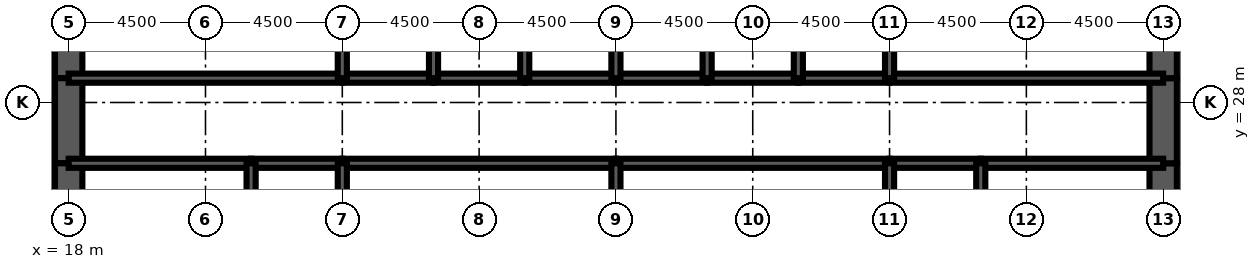
"""IFC4 building model, lengths in metres.
Left out: names, types, materials, properties, quantities, classifications, styles, units other than length and angle.
Written with IfcOpenShell. Run it as: python <this file> out.ifc"""

import sys

from ifc_helpers import new_model, si_unit, direction, frame, frame_2d, origin, place, context, subcontext, project, spatial, rectangle, extrude, element, fill, save


model = new_model("IFC4")
c1 = context("Model", 3, precision=1e-05, world=origin(), true_north=direction((0.0, 1.0)))
c2 = subcontext(c1, "Body", "Model", "MODEL_VIEW")
j1 = project(units=[si_unit("LENGTHUNIT", "METRE"), si_unit("PLANEANGLEUNIT", "RADIAN")], contexts=[c1])
p1 = place(None, origin())
s1 = spatial("IfcSite", under=j1, at=p1, CompositionType="ELEMENT")
p2 = place(p1, origin())
s2 = spatial("IfcBuilding", under=s1, at=p2, CompositionType="ELEMENT")
p3 = place(p2, frame((0.0, 0.0, 86.0)))
s3 = spatial("IfcBuildingStorey", under=s2, at=p3, CompositionType="ELEMENT", Elevation=86.0)
p4 = place(p3, frame((18.0, 32.0, 0.0), z_axis=(0.0, 0.0, 1.0), x_axis=(0.0, -1.0, 0.0)))
e1 = element("IfcWall", 1, at=p4, inside=s3, PredefinedType="SHEAR", context=c2, shape_type="SweptSolid", body=[
    extrude(rectangle(XDim=3.2, YDim=0.9, at=frame_2d((1.6, 0.0))), origin(), (0.0, 0.0, 1.0), 4.5),
])
p5 = place(p3, frame((18.0, 28.8, 0.0), z_axis=(0.0, 0.0, 1.0), x_axis=(0.0, -1.0, 0.0)))
e2 = element("IfcWall", 2, at=p5, inside=s3, PredefinedType="SHEAR", context=c2, shape_type="SweptSolid", body=[
    extrude(rectangle(XDim=2.8, YDim=0.9, at=frame_2d((1.4, 0.0))), origin(), (0.0, 0.0, 1.0), 4.5),
])
p6 = place(p5, frame((0.4, 0.0, 0.0)))
e3 = element("IfcOpeningElement", 3, at=p6, cuts=e2, PredefinedType="OPENING", context=c2, shape_type="SweptSolid", body=[
    extrude(rectangle(XDim=1.8, YDim=2.1, at=frame_2d((0.9, 1.05))), frame((0.0, 0.46, 0.0), z_axis=(0.0, -1.0, 0.0), x_axis=(1.0, 0.0, 0.0)), (0.0, 0.0, 1.0), 0.92),
])
for number, where, z_axis, x_axis in (
    (4, (18.0, 26.0, 0.0), (0.0, 0.0, 1.0), (0.0, -1.0, 0.0)),
    (5, (54.0, 22.0, 0.0), (0.0, 0.0, 1.0), (0.0, 1.0, 0.0)),
):
    element("IfcWall", number, at=place(p3, frame(where, z_axis=z_axis, x_axis=x_axis)), inside=s3, PredefinedType="SHEAR", context=c2, shape_type="SweptSolid", body=[
        extrude(rectangle(XDim=4.0, YDim=0.9, at=frame_2d((2.0, 0.0))), origin(), (0.0, 0.0, 1.0), 4.5),
    ])
p7 = place(p3, frame((54.0, 26.0, 0.0), z_axis=(0.0, 0.0, 1.0), x_axis=(0.0, 1.0, 0.0)))
e6 = element("IfcWall", 6, at=p7, inside=s3, PredefinedType="SHEAR", context=c2, shape_type="SweptSolid", body=[
    extrude(rectangle(XDim=2.8, YDim=0.9, at=frame_2d((1.4, 0.0))), origin(), (0.0, 0.0, 1.0), 4.5),
])
p8 = place(p7, frame((0.6, 0.0, 0.0)))
e7 = element("IfcOpeningElement", 7, at=p8, cuts=e6, PredefinedType="OPENING", context=c2, shape_type="SweptSolid", body=[
    extrude(rectangle(XDim=1.8, YDim=2.1, at=frame_2d((0.9, 1.05))), frame((0.0, 0.46, 0.0), z_axis=(0.0, -1.0, 0.0), x_axis=(1.0, 0.0, 0.0)), (0.0, 0.0, 1.0), 0.92),
])
p9 = place(p3, frame((54.0, 28.8, 0.0), z_axis=(0.0, 0.0, 1.0), x_axis=(0.0, 1.0, 0.0)))
e8 = element("IfcWall", 8, at=p9, inside=s3, PredefinedType="SHEAR", context=c2, shape_type="SweptSolid", body=[
    extrude(rectangle(XDim=3.2, YDim=0.9, at=frame_2d((1.6, 0.0))), origin(), (0.0, 0.0, 1.0), 4.5),
])
p10 = place(p3, frame((18.0, 28.8, 0.0), z_axis=(0.0, 0.0, 1.0), x_axis=(1.0, 0.0, 0.0)))
e9 = element("IfcWall", 9, at=p10, inside=s3, PredefinedType="SOLIDWALL", context=c2, shape_type="SweptSolid", body=[
    extrude(rectangle(XDim=9.0, YDim=0.3, at=frame_2d((4.5, 0.0))), origin(), (0.0, 0.0, 1.0), 4.5),
])
p11 = place(p10, frame((0.65, 0.0, 0.0)))
e10 = element("IfcOpeningElement", 10, at=p11, cuts=e9, PredefinedType="OPENING", context=c2, shape_type="SweptSolid", body=[
    extrude(rectangle(XDim=1.0, YDim=2.1, at=frame_2d((0.5, 1.05))), frame((0.0, 0.16, 0.0), z_axis=(0.0, -1.0, 0.0), x_axis=(1.0, 0.0, 0.0)), (0.0, 0.0, 1.0), 0.32),
])
p12 = place(p3, frame((27.0, 28.8, 0.0), z_axis=(0.0, 0.0, 1.0), x_axis=(1.0, 0.0, 0.0)))
e11 = element("IfcWall", 11, at=p12, inside=s3, PredefinedType="SOLIDWALL", context=c2, shape_type="SweptSolid", body=[
    extrude(rectangle(XDim=3.0, YDim=0.3, at=frame_2d((1.5, 0.0))), origin(), (0.0, 0.0, 1.0), 4.5),
])
p13 = place(p12, frame((0.95, 0.0, 0.0)))
e12 = element("IfcOpeningElement", 12, at=p13, cuts=e11, PredefinedType="OPENING", context=c2, shape_type="SweptSolid", body=[
    extrude(rectangle(XDim=1.1, YDim=2.2, at=frame_2d((0.55, 1.1))), frame((0.0, 0.16, 0.0), z_axis=(0.0, -1.0, 0.0), x_axis=(1.0, 0.0, 0.0)), (0.0, 0.0, 1.0), 0.32),
])
p14 = place(p3, frame((30.0, 28.8, 0.0), z_axis=(0.0, 0.0, 1.0), x_axis=(1.0, 0.0, 0.0)))
e13 = element("IfcWall", 13, at=p14, inside=s3, PredefinedType="SOLIDWALL", context=c2, shape_type="SweptSolid", body=[
    extrude(rectangle(XDim=3.0, YDim=0.3, at=frame_2d((1.5, 0.0))), origin(), (0.0, 0.0, 1.0), 4.5),
])
p15 = place(p14, frame((0.95, 0.0, 0.0)))
e14 = element("IfcOpeningElement", 14, at=p15, cuts=e13, PredefinedType="OPENING", context=c2, shape_type="SweptSolid", body=[
    extrude(rectangle(XDim=1.1, YDim=2.2, at=frame_2d((0.55, 1.1))), frame((0.0, 0.16, 0.0), z_axis=(0.0, -1.0, 0.0), x_axis=(1.0, 0.0, 0.0)), (0.0, 0.0, 1.0), 0.32),
])
p16 = place(p3, frame((33.0, 28.8, 0.0), z_axis=(0.0, 0.0, 1.0), x_axis=(1.0, 0.0, 0.0)))
e15 = element("IfcWall", 15, at=p16, inside=s3, PredefinedType="SOLIDWALL", context=c2, shape_type="SweptSolid", body=[
    extrude(rectangle(XDim=3.0, YDim=0.3, at=frame_2d((1.5, 0.0))), origin(), (0.0, 0.0, 1.0), 4.5),
])
p17 = place(p16, frame((0.95, 0.0, 0.0)))
e16 = element("IfcOpeningElement", 16, at=p17, cuts=e15, PredefinedType="OPENING", context=c2, shape_type="SweptSolid", body=[
    extrude(rectangle(XDim=1.1, YDim=2.2, at=frame_2d((0.55, 1.1))), frame((0.0, 0.16, 0.0), z_axis=(0.0, -1.0, 0.0), x_axis=(1.0, 0.0, 0.0)), (0.0, 0.0, 1.0), 0.32),
])
for number, where, z_axis, x_axis in (
    (17, (36.0, 28.8, 0.0), (0.0, 0.0, 1.0), (1.0, 0.0, 0.0)),
    (18, (39.0, 28.8, 0.0), (0.0, 0.0, 1.0), (1.0, 0.0, 0.0)),
):
    element("IfcWall", number, at=place(p3, frame(where, z_axis=z_axis, x_axis=x_axis)), inside=s3, PredefinedType="SOLIDWALL", context=c2, shape_type="SweptSolid", body=[
        extrude(rectangle(XDim=3.0, YDim=0.3, at=frame_2d((1.5, 0.0))), origin(), (0.0, 0.0, 1.0), 4.5),
    ])
p18 = place(p3, frame((42.0, 28.8, 0.0), z_axis=(0.0, 0.0, 1.0), x_axis=(1.0, 0.0, 0.0)))
e19 = element("IfcWall", 19, at=p18, inside=s3, PredefinedType="SOLIDWALL", context=c2, shape_type="SweptSolid", body=[
    extrude(rectangle(XDim=3.0, YDim=0.3, at=frame_2d((1.5, 0.0))), origin(), (0.0, 0.0, 1.0), 4.5),
])
p19 = place(p18, frame((0.95, 0.0, 0.0)))
e20 = element("IfcOpeningElement", 20, at=p19, cuts=e19, PredefinedType="OPENING", context=c2, shape_type="SweptSolid", body=[
    extrude(rectangle(XDim=1.1, YDim=2.2, at=frame_2d((0.55, 1.1))), frame((0.0, 0.16, 0.0), z_axis=(0.0, -1.0, 0.0), x_axis=(1.0, 0.0, 0.0)), (0.0, 0.0, 1.0), 0.32),
])
p20 = place(p3, frame((45.0, 28.8, 0.0), z_axis=(0.0, 0.0, 1.0), x_axis=(1.0, 0.0, 0.0)))
e21 = element("IfcWall", 21, at=p20, inside=s3, PredefinedType="SOLIDWALL", context=c2, shape_type="SweptSolid", body=[
    extrude(rectangle(XDim=9.0, YDim=0.3, at=frame_2d((4.5, 0.0))), origin(), (0.0, 0.0, 1.0), 4.5),
])
p21 = place(p20, frame((7.35, 0.0, 0.0)))
e22 = element("IfcOpeningElement", 22, at=p21, cuts=e21, PredefinedType="OPENING", context=c2, shape_type="SweptSolid", body=[
    extrude(rectangle(XDim=1.0, YDim=2.1, at=frame_2d((0.5, 1.05))), frame((0.0, 0.16, 0.0), z_axis=(0.0, -1.0, 0.0), x_axis=(1.0, 0.0, 0.0)), (0.0, 0.0, 1.0), 0.32),
])
p22 = place(p3, frame((18.0, 26.0, 0.0), z_axis=(0.0, 0.0, 1.0), x_axis=(1.0, 0.0, 0.0)))
e23 = element("IfcWall", 23, at=p22, inside=s3, PredefinedType="SOLIDWALL", context=c2, shape_type="SweptSolid", body=[
    extrude(rectangle(XDim=6.0, YDim=0.3, at=frame_2d((3.0, 0.0))), origin(), (0.0, 0.0, 1.0), 4.5),
])
p23 = place(p3, frame((24.0, 26.0, 0.0), z_axis=(0.0, 0.0, 1.0), x_axis=(1.0, 0.0, 0.0)))
e24 = element("IfcWall", 24, at=p23, inside=s3, PredefinedType="SOLIDWALL", context=c2, shape_type="SweptSolid", body=[
    extrude(rectangle(XDim=3.0, YDim=0.3, at=frame_2d((1.5, 0.0))), origin(), (0.0, 0.0, 1.0), 4.5),
])
for number, where, z_axis, x_axis in (
    (25, (27.0, 26.0, 0.0), (0.0, 0.0, 1.0), (1.0, 0.0, 0.0)),
    (26, (36.0, 26.0, 0.0), (0.0, 0.0, 1.0), (1.0, 0.0, 0.0)),
):
    element("IfcWall", number, at=place(p3, frame(where, z_axis=z_axis, x_axis=x_axis)), inside=s3, PredefinedType="SOLIDWALL", context=c2, shape_type="SweptSolid", body=[
        extrude(rectangle(XDim=9.0, YDim=0.3, at=frame_2d((4.5, 0.0))), origin(), (0.0, 0.0, 1.0), 4.5),
    ])
p24 = place(p3, frame((45.0, 26.0, 0.0), z_axis=(0.0, 0.0, 1.0), x_axis=(1.0, 0.0, 0.0)))
e27 = element("IfcWall", 27, at=p24, inside=s3, PredefinedType="SOLIDWALL", context=c2, shape_type="SweptSolid", body=[
    extrude(rectangle(XDim=3.0, YDim=0.3, at=frame_2d((1.5, 0.0))), origin(), (0.0, 0.0, 1.0), 4.5),
])
p25 = place(p3, frame((48.0, 26.0, 0.0), z_axis=(0.0, 0.0, 1.0), x_axis=(1.0, 0.0, 0.0)))
e28 = element("IfcWall", 28, at=p25, inside=s3, PredefinedType="SOLIDWALL", context=c2, shape_type="SweptSolid", body=[
    extrude(rectangle(XDim=6.0, YDim=0.3, at=frame_2d((3.0, 0.0))), origin(), (0.0, 0.0, 1.0), 4.5),
])
for number, where, z_axis, x_axis in (
    (29, (27.0, 28.8, 0.0), (0.0, 0.0, 1.0), (0.0, 1.0, 0.0)),
    (30, (30.0, 28.8, 0.0), (0.0, 0.0, 1.0), (0.0, 1.0, 0.0)),
    (31, (33.0, 28.8, 0.0), (0.0, 0.0, 1.0), (0.0, 1.0, 0.0)),
    (32, (36.0, 28.8, 0.0), (0.0, 0.0, 1.0), (0.0, 1.0, 0.0)),
    (33, (39.0, 28.8, 0.0), (0.0, 0.0, 1.0), (0.0, 1.0, 0.0)),
    (34, (42.0, 28.8, 0.0), (0.0, 0.0, 1.0), (0.0, 1.0, 0.0)),
    (35, (45.0, 28.8, 0.0), (0.0, 0.0, 1.0), (0.0, 1.0, 0.0)),
):
    element("IfcWall", number, at=place(p3, frame(where, z_axis=z_axis, x_axis=x_axis)), inside=s3, PredefinedType="SOLIDWALL", context=c2, shape_type="SweptSolid", body=[
        extrude(rectangle(XDim=3.2, YDim=0.3, at=frame_2d((1.6, 0.0))), origin(), (0.0, 0.0, 1.0), 4.5),
    ])
for number, where, z_axis, x_axis in (
    (36, (24.0, 22.0, 0.0), (0.0, 0.0, 1.0), (0.0, 1.0, 0.0)),
    (37, (27.0, 22.0, 0.0), (0.0, 0.0, 1.0), (0.0, 1.0, 0.0)),
    (38, (36.0, 22.0, 0.0), (0.0, 0.0, 1.0), (0.0, 1.0, 0.0)),
    (39, (45.0, 22.0, 0.0), (0.0, 0.0, 1.0), (0.0, 1.0, 0.0)),
    (40, (48.0, 22.0, 0.0), (0.0, 0.0, 1.0), (0.0, 1.0, 0.0)),
):
    element("IfcWall", number, at=place(p3, frame(where, z_axis=z_axis, x_axis=x_axis)), inside=s3, PredefinedType="SOLIDWALL", context=c2, shape_type="SweptSolid", body=[
        extrude(rectangle(XDim=4.0, YDim=0.3, at=frame_2d((2.0, 0.0))), origin(), (0.0, 0.0, 1.0), 4.5),
    ])
p26 = place(p3, frame((39.0, 22.15, 0.0), z_axis=(0.0, 0.0, 1.0), x_axis=(0.0, 1.0, 0.0)))
e41 = element("IfcWall", 41, at=p26, inside=s3, PredefinedType="PARTITIONING", context=c2, shape_type="SweptSolid", body=[
    extrude(rectangle(XDim=3.7, YDim=0.15, at=frame_2d((1.85, 0.0))), origin(), (0.0, 0.0, 1.0), 3.0),
])
p27 = place(p26, frame((2.2, 0.0, 0.0)))
e42 = element("IfcOpeningElement", 42, at=p27, cuts=e41, PredefinedType="OPENING", context=c2, shape_type="SweptSolid", body=[
    extrude(rectangle(XDim=1.0, YDim=2.1, at=frame_2d((0.5, 1.05))), frame((0.0, 0.085, 0.0), z_axis=(0.0, -1.0, 0.0), x_axis=(1.0, 0.0, 0.0)), (0.0, 0.0, 1.0), 0.17),
])
for number, where, z_axis, x_axis in (
    (43, (20.325, 22.15, 0.0), (0.0, 0.0, 1.0), (0.0, 1.0, 0.0)),
    (44, (51.375, 22.15, 0.0), (0.0, 0.0, 1.0), (0.0, 1.0, 0.0)),
):
    element("IfcWall", number, at=place(p3, frame(where, z_axis=z_axis, x_axis=x_axis)), inside=s3, PredefinedType="PARTITIONING", context=c2, shape_type="SweptSolid", body=[
        extrude(rectangle(XDim=3.7, YDim=0.15, at=frame_2d((1.85, 0.0))), origin(), (0.0, 0.0, 1.0), 3.0),
    ])
p28 = place(p27, origin())
e45 = element("IfcDoor", 45, at=p28, inside=s3, OperationType="SINGLE_SWING_RIGHT", PredefinedType="DOOR", context=c2, shape_type="SweptSolid", body=[
    extrude(rectangle(XDim=1.0, YDim=2.1, at=frame_2d((0.5, 1.05))), frame((0.0, 0.025, 0.0), z_axis=(0.0, -1.0, 0.0), x_axis=(1.0, 0.0, 0.0)), (0.0, 0.0, 1.0), 0.05),
])
fill(e42, e45)
p29 = place(p19, origin())
e46 = element("IfcDoor", 46, at=p29, inside=s3, OperationType="DOUBLE_DOOR_SLIDING", PredefinedType="USERDEFINED", context=c2, shape_type="SweptSolid", body=[
    extrude(rectangle(XDim=1.1, YDim=2.2, at=frame_2d((0.55, 1.1))), frame((0.0, 0.025, 0.0), z_axis=(0.0, -1.0, 0.0), x_axis=(1.0, 0.0, 0.0)), (0.0, 0.0, 1.0), 0.05),
])
fill(e20, e46)
p30 = place(p13, origin())
e47 = element("IfcDoor", 47, at=p30, inside=s3, OperationType="DOUBLE_DOOR_SLIDING", PredefinedType="USERDEFINED", context=c2, shape_type="SweptSolid", body=[
    extrude(rectangle(XDim=1.1, YDim=2.2, at=frame_2d((0.55, 1.1))), frame((0.0, 0.025, 0.0), z_axis=(0.0, -1.0, 0.0), x_axis=(1.0, 0.0, 0.0)), (0.0, 0.0, 1.0), 0.05),
])
fill(e12, e47)
p31 = place(p15, origin())
e48 = element("IfcDoor", 48, at=p31, inside=s3, OperationType="DOUBLE_DOOR_SLIDING", PredefinedType="USERDEFINED", context=c2, shape_type="SweptSolid", body=[
    extrude(rectangle(XDim=1.1, YDim=2.2, at=frame_2d((0.55, 1.1))), frame((0.0, 0.025, 0.0), z_axis=(0.0, -1.0, 0.0), x_axis=(1.0, 0.0, 0.0)), (0.0, 0.0, 1.0), 0.05),
])
fill(e14, e48)
p32 = place(p17, origin())
e49 = element("IfcDoor", 49, at=p32, inside=s3, OperationType="DOUBLE_DOOR_SLIDING", PredefinedType="USERDEFINED", context=c2, shape_type="SweptSolid", body=[
    extrude(rectangle(XDim=1.1, YDim=2.2, at=frame_2d((0.55, 1.1))), frame((0.0, 0.025, 0.0), z_axis=(0.0, -1.0, 0.0), x_axis=(1.0, 0.0, 0.0)), (0.0, 0.0, 1.0), 0.05),
])
fill(e16, e49)
p33 = place(p11, origin())
e50 = element("IfcDoor", 50, at=p33, inside=s3, OperationType="SINGLE_SWING_LEFT", PredefinedType="DOOR", context=c2, shape_type="SweptSolid", body=[
    extrude(rectangle(XDim=1.0, YDim=2.1, at=frame_2d((0.5, 1.05))), frame((0.0, 0.025, 0.0), z_axis=(0.0, -1.0, 0.0), x_axis=(1.0, 0.0, 0.0)), (0.0, 0.0, 1.0), 0.05),
])
fill(e10, e50)
p34 = place(p21, origin())
e51 = element("IfcDoor", 51, at=p34, inside=s3, OperationType="SINGLE_SWING_RIGHT", PredefinedType="DOOR", context=c2, shape_type="SweptSolid", body=[
    extrude(rectangle(XDim=1.0, YDim=2.1, at=frame_2d((0.5, 1.05))), frame((0.0, 0.025, 0.0), z_axis=(0.0, -1.0, 0.0), x_axis=(1.0, 0.0, 0.0)), (0.0, 0.0, 1.0), 0.05),
])
fill(e22, e51)
p35 = place(p6, origin())
e52 = element("IfcDoor", 52, at=p35, inside=s3, OperationType="SINGLE_SWING_LEFT", PredefinedType="DOOR", context=c2, shape_type="SweptSolid", body=[
    extrude(rectangle(XDim=1.8, YDim=2.1, at=frame_2d((0.9, 1.05))), frame((0.0, 0.45, 0.0), z_axis=(0.0, -1.0, 0.0), x_axis=(1.0, 0.0, 0.0)), (0.0, 0.0, 1.0), 0.899),
])
fill(e3, e52)
p36 = place(p8, origin())
e53 = element("IfcDoor", 53, at=p36, inside=s3, OperationType="SINGLE_SWING_LEFT", PredefinedType="DOOR", context=c2, shape_type="SweptSolid", body=[
    extrude(rectangle(XDim=1.8, YDim=2.1, at=frame_2d((0.9, 1.05))), frame((0.0, 0.45, 0.0), z_axis=(0.0, -1.0, 0.0), x_axis=(1.0, 0.0, 0.0)), (0.0, 0.0, 1.0), 0.899),
])
fill(e7, e53)
save(model, sys.argv[1])
